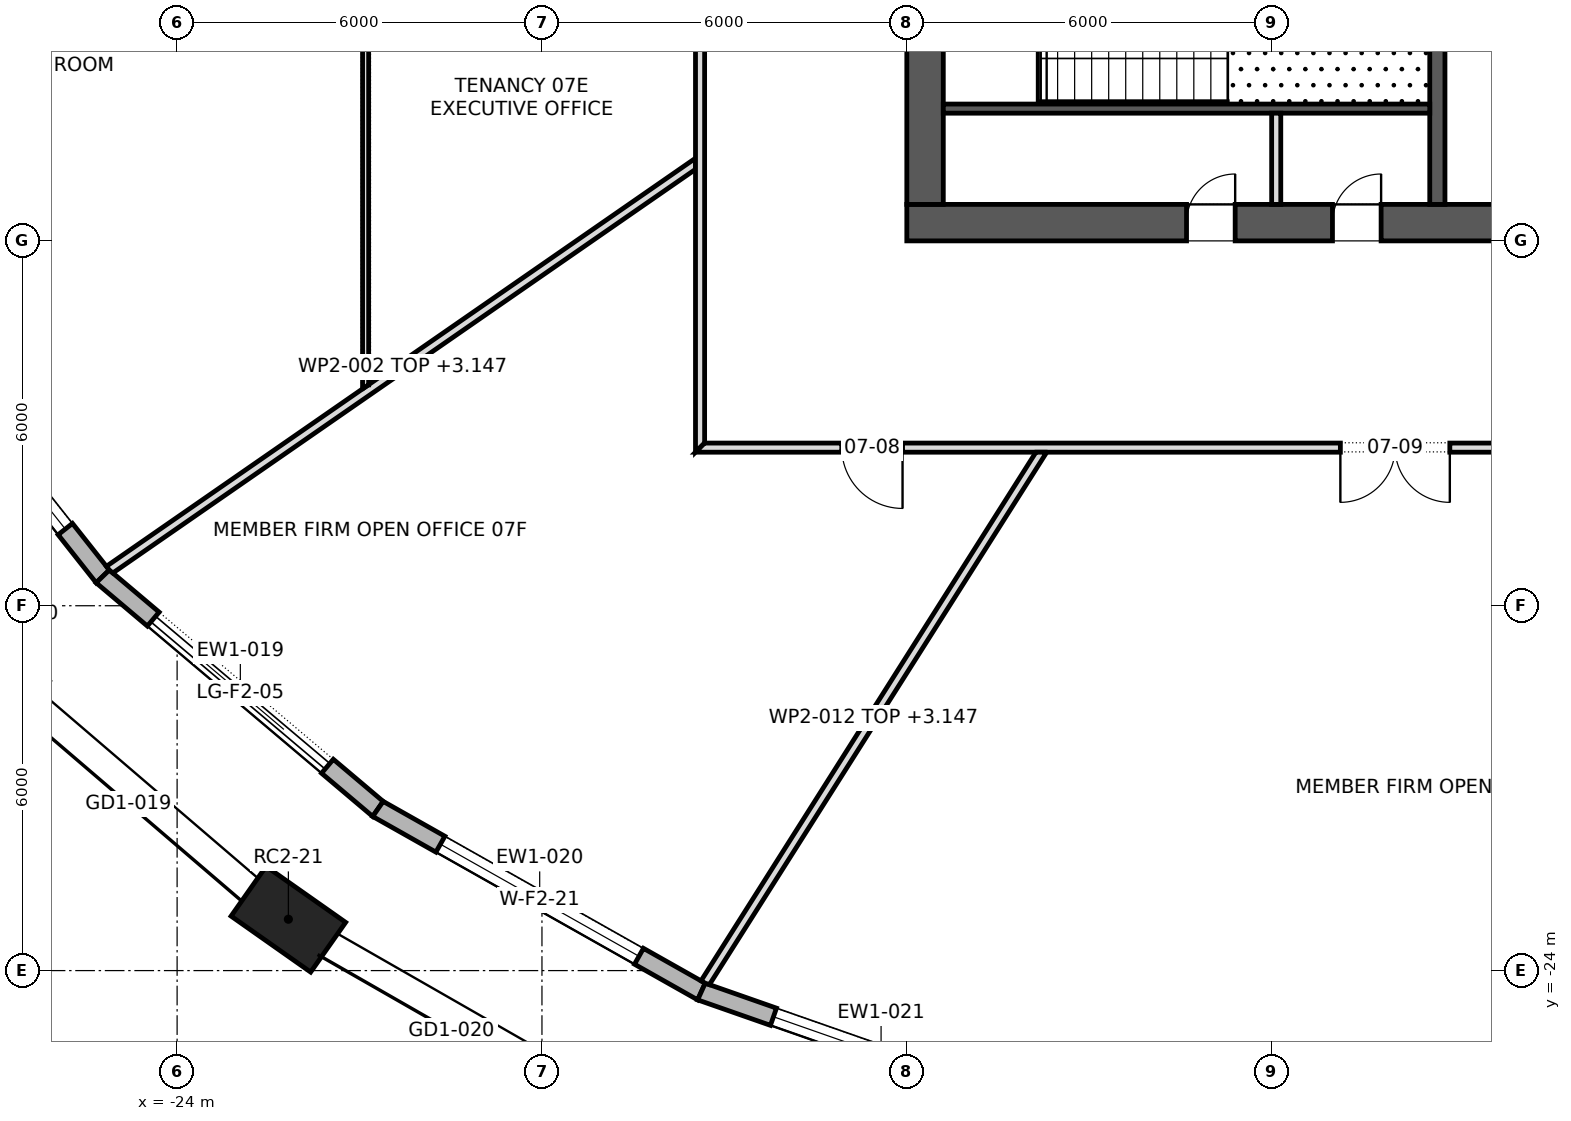
"""IFC4 building model, lengths in metres.
Left out: names, types, materials, properties, quantities, classifications, styles, units other than length and angle.
Written with IfcOpenShell. Run it as: python <this file> out.ifc"""

import sys

from ifc_helpers import new_model, si_unit, direction, frame, frame_2d, origin, origin_2d, place, context, subcontext, project, spatial, polyline, rectangle, outline, extrude, element, fill, save


model = new_model("IFC4")
c1 = context("Model", 3, precision=1e-05, world=origin(), true_north=direction((0.0, 1.0)))
c2 = subcontext(c1, "Body", "Model", "MODEL_VIEW")
j1 = project(units=[si_unit("LENGTHUNIT", "METRE"), si_unit("PLANEANGLEUNIT", "RADIAN")], contexts=[c1])
p1 = place(None, origin())
s1 = spatial("IfcSite", under=j1, at=p1, CompositionType="ELEMENT")
p2 = place(p1, origin())
s2 = spatial("IfcBuilding", under=s1, at=p2, CompositionType="ELEMENT")
p3 = place(p2, frame((0.0, 0.0, 112.9)))
s3 = spatial("IfcBuildingStorey", under=s2, at=p3, CompositionType="ELEMENT", Elevation=112.9)
p4 = place(p3, frame((-22.17, -23.156, 0.0), z_axis=(0.0, 0.0, 1.0), x_axis=(0.817906779671, -0.575350762377, 0.0)))
e1 = element("IfcColumn", 1, at=p4, inside=s3, PredefinedType="COLUMN", context=c2, shape_type="SweptSolid", body=[
    extrude(rectangle(XDim=1.6, YDim=1.0, at=origin_2d()), origin(), (0.0, 0.0, 1.0), 4.2),
])
p5 = place(p3, frame((-12.0, -11.7, 0.0), z_axis=(0.0, 0.0, 1.0), x_axis=(1.0, 0.0, 0.0)))
e2 = element("IfcWall", 2, at=p5, inside=s3, PredefinedType="SHEAR", context=c2, shape_type="SweptSolid", body=[
    extrude(rectangle(XDim=24.0, YDim=0.6, at=frame_2d((12.0, 0.0))), origin(), (0.0, 0.0, 1.0), 4.2),
])
p6 = place(p5, frame((9.975, 0.0, 0.0)))
e3 = element("IfcOpeningElement", 3, at=p6, cuts=e2, PredefinedType="OPENING", context=c2, shape_type="SweptSolid", body=[
    extrude(rectangle(XDim=0.9, YDim=2.1, at=frame_2d((0.45, 1.05))), frame((0.0, 0.312, 0.0), z_axis=(0.0, -1.0, 0.0), x_axis=(1.0, 0.0, 0.0)), (0.0, 0.0, 1.0), 0.624),
])
p7 = place(p5, frame((4.6, 0.0, 0.0)))
e4 = element("IfcOpeningElement", 4, at=p7, cuts=e2, PredefinedType="OPENING", context=c2, shape_type="SweptSolid", body=[
    extrude(rectangle(XDim=0.8, YDim=2.1, at=frame_2d((0.4, 1.05))), frame((0.0, 0.312, 0.0), z_axis=(0.0, -1.0, 0.0), x_axis=(1.0, 0.0, 0.0)), (0.0, 0.0, 1.0), 0.624),
])
p8 = place(p5, frame((7.0, 0.0, 0.0)))
e5 = element("IfcOpeningElement", 5, at=p8, cuts=e2, PredefinedType="OPENING", context=c2, shape_type="SweptSolid", body=[
    extrude(rectangle(XDim=0.8, YDim=2.1, at=frame_2d((0.4, 1.05))), frame((0.0, 0.312, 0.0), z_axis=(0.0, -1.0, 0.0), x_axis=(1.0, 0.0, 0.0)), (0.0, 0.0, 1.0), 0.624),
])
p9 = place(p5, frame((15.85, 0.0, 0.0)))
e6 = element("IfcOpeningElement", 6, at=p9, cuts=e2, PredefinedType="OPENING", context=c2, shape_type="SweptSolid", body=[
    extrude(rectangle(XDim=0.8, YDim=2.1, at=frame_2d((0.4, 1.05))), frame((0.0, 0.312, 0.0), z_axis=(0.0, -1.0, 0.0), x_axis=(1.0, 0.0, 0.0)), (0.0, 0.0, 1.0), 0.624),
])
p10 = place(p3, frame((-11.7, -11.4, 0.0), z_axis=(0.0, 0.0, 1.0), x_axis=(0.0, 1.0, 0.0)))
e7 = element("IfcWall", 7, at=p10, inside=s3, PredefinedType="SHEAR", context=c2, shape_type="SweptSolid", body=[
    extrude(rectangle(XDim=22.8, YDim=0.6, at=frame_2d((11.4, 0.0))), origin(), (0.0, 0.0, 1.0), 4.2),
])
p11 = place(p10, frame((10.2, 0.0, 0.0)))
e8 = element("IfcOpeningElement", 8, at=p11, cuts=e7, PredefinedType="OPENING", context=c2, shape_type="SweptSolid", body=[
    extrude(rectangle(XDim=2.4, YDim=2.1, at=frame_2d((1.2, 1.05))), frame((0.0, 0.312, 0.0), z_axis=(0.0, -1.0, 0.0), x_axis=(1.0, 0.0, 0.0)), (0.0, 0.0, 1.0), 0.624),
])
p12 = place(p10, frame((18.925, 0.0, 0.0)))
e9 = element("IfcOpeningElement", 9, at=p12, cuts=e7, PredefinedType="OPENING", context=c2, shape_type="SweptSolid", body=[
    extrude(rectangle(XDim=1.2, YDim=2.1, at=frame_2d((0.6, 1.05))), frame((0.0, 0.312, 0.0), z_axis=(0.0, -1.0, 0.0), x_axis=(1.0, 0.0, 0.0)), (0.0, 0.0, 1.0), 0.624),
])
p13 = place(p10, frame((2.675, 0.0, 0.0)))
e10 = element("IfcOpeningElement", 10, at=p13, cuts=e7, PredefinedType="OPENING", context=c2, shape_type="SweptSolid", body=[
    extrude(rectangle(XDim=1.2, YDim=2.1, at=frame_2d((0.6, 1.05))), frame((0.0, 0.312, 0.0), z_axis=(0.0, -1.0, 0.0), x_axis=(1.0, 0.0, 0.0)), (0.0, 0.0, 1.0), 0.624),
])
p14 = place(p3, frame((-28.781, -13.019, 0.0), z_axis=(0.0, 0.0, 1.0), x_axis=(0.620329992039, -0.784340934146, 0.0)))
e11 = element("IfcWall", 11, at=p14, inside=s3, PredefinedType="STANDARD", context=c2, shape_type="SweptSolid", body=[
    extrude(outline(polyline([(-0.016, -0.15), (5.75, -0.15), (5.72, 0.15), (0.016, 0.15), (-0.016, -0.15)])), origin(), (0.0, 0.0, 1.0), 3.9),
])
p15 = place(p14, frame((0.993, 0.0, 0.6)))
e12 = element("IfcOpeningElement", 12, at=p15, cuts=e11, PredefinedType="OPENING", context=c2, shape_type="SweptSolid", body=[
    extrude(rectangle(XDim=3.75, YDim=2.85, at=frame_2d((1.875, 1.425))), frame((0.0, 0.162, 0.0), z_axis=(0.0, -1.0, 0.0), x_axis=(1.0, 0.0, 0.0)), (0.0, 0.0, 1.0), 0.324),
])
p16 = place(p3, frame((-25.223, -17.518, 0.0), z_axis=(0.0, 0.0, 1.0), x_axis=(0.763894031266, -0.645341699409, 0.0)))
e13 = element("IfcWall", 13, at=p16, inside=s3, PredefinedType="STANDARD", context=c2, shape_type="SweptSolid", body=[
    extrude(outline(polyline([(-0.015, -0.15), (5.939, -0.15), (5.911, 0.15), (0.015, 0.15), (-0.015, -0.15)])), origin(), (0.0, 0.0, 1.0), 3.9),
])
p17 = place(p16, frame((1.087, 0.0, 0.0)))
e14 = element("IfcOpeningElement", 14, at=p17, cuts=e13, PredefinedType="OPENING", context=c2, shape_type="SweptSolid", body=[
    extrude(rectangle(XDim=3.75, YDim=3.45, at=frame_2d((1.875, 1.725))), frame((0.0, 0.162, 0.0), z_axis=(0.0, -1.0, 0.0), x_axis=(1.0, 0.0, 0.0)), (0.0, 0.0, 1.0), 0.324),
])
p18 = place(p3, frame((-20.697, -21.341, 0.0), z_axis=(0.0, 0.0, 1.0), x_axis=(0.870828448417, -0.491587035455, 0.0)))
e15 = element("IfcWall", 15, at=p18, inside=s3, PredefinedType="STANDARD", context=c2, shape_type="SweptSolid", body=[
    extrude(outline(polyline([(-0.014, -0.15), (6.122, -0.15), (6.095, 0.15), (0.014, 0.15), (-0.014, -0.15)])), origin(), (0.0, 0.0, 1.0), 3.9),
])
p19 = place(p18, frame((1.179, 0.0, 0.6)))
e16 = element("IfcOpeningElement", 16, at=p19, cuts=e15, PredefinedType="OPENING", context=c2, shape_type="SweptSolid", body=[
    extrude(rectangle(XDim=3.75, YDim=2.85, at=frame_2d((1.875, 1.425))), frame((0.0, 0.162, 0.0), z_axis=(0.0, -1.0, 0.0), x_axis=(1.0, 0.0, 0.0)), (0.0, 0.0, 1.0), 0.324),
])
p20 = place(p3, frame((-15.377, -24.344, 0.0), z_axis=(0.0, 0.0, 1.0), x_axis=(0.943866868202, -0.330326104193, 0.0)))
e17 = element("IfcWall", 17, at=p20, inside=s3, PredefinedType="STANDARD", context=c2, shape_type="SweptSolid", body=[
    extrude(outline(polyline([(-0.013, -0.15), (6.273, -0.15), (6.247, 0.15), (0.013, 0.15), (-0.013, -0.15)])), origin(), (0.0, 0.0, 1.0), 3.9),
])
p21 = place(p20, frame((1.255, 0.0, 0.6)))
e18 = element("IfcOpeningElement", 18, at=p21, cuts=e17, PredefinedType="OPENING", context=c2, shape_type="SweptSolid", body=[
    extrude(rectangle(XDim=3.75, YDim=2.85, at=frame_2d((1.875, 1.425))), frame((0.0, 0.162, 0.0), z_axis=(0.0, -1.0, 0.0), x_axis=(1.0, 0.0, 0.0)), (0.0, 0.0, 1.0), 0.324),
])
p22 = place(p3, frame((-3.275, -11.4, 0.0), z_axis=(0.0, 0.0, 1.0), x_axis=(0.0, 1.0, 0.0)))
e19 = element("IfcWall", 19, at=p22, inside=s3, PredefinedType="SHEAR", context=c2, shape_type="SweptSolid", body=[
    extrude(rectangle(XDim=4.9, YDim=0.25, at=frame_2d((2.45, 0.0))), origin(), (0.0, 0.0, 1.0), 3.9),
])
p23 = place(p3, frame((-11.4, -9.825, 0.0), z_axis=(0.0, 0.0, 1.0), x_axis=(1.0, 0.0, 0.0)))
e20 = element("IfcWall", 20, at=p23, inside=s3, PredefinedType="SHEAR", context=c2, shape_type="SweptSolid", body=[
    extrude(rectangle(XDim=8.0, YDim=0.15, at=frame_2d((4.0, 0.0))), origin(), (0.0, 0.0, 1.0), 3.9),
])
p24 = place(p3, frame((-5.925, -11.4, 0.0), z_axis=(0.0, 0.0, 1.0), x_axis=(0.0, 1.0, 0.0)))
e21 = element("IfcWall", 21, at=p24, inside=s3, PredefinedType="PARTITIONING", context=c2, shape_type="SweptSolid", body=[
    extrude(rectangle(XDim=1.5, YDim=0.15, at=frame_2d((0.75, 0.0))), origin(), (0.0, 0.0, 1.0), 3.9),
])
p25 = place(p3, frame((-25.12, -17.414, 0.0), z_axis=(0.0, 0.0, 1.0), x_axis=(0.822008683907, 0.569474954306, 0.0)))
e22 = element("IfcWall", 22, at=p25, inside=s3, PredefinedType="PARTITIONING", context=c2, shape_type="SweptSolid", body=[
    extrude(outline(polyline([(0.024, -0.075), (1.967, -0.075), (3.91, -0.075), (5.853, -0.075), (7.796, -0.075), (9.739, -0.075), (11.681, -0.075), (11.734, 0.002), (11.734, 0.002), (11.785, 0.074), (11.785, 0.075), (10.15, 0.075), (8.516, 0.075), (6.881, 0.075), (5.246, 0.075), (5.245, 0.072), (5.241, 0.075), (3.494, 0.075), (1.747, 0.075), (0.0, 0.075), (0.0, 0.07), (0.005, -0.002), (0.024, -0.075)])), origin(), (0.0, 0.0, 1.0), 3.147),
])
p26 = place(p3, frame((-20.9, -14.434, 0.0), z_axis=(0.0, 0.0, 1.0), x_axis=(0.0, 1.0, 0.0)))
e23 = element("IfcWall", 23, at=p26, inside=s3, PredefinedType="PARTITIONING", context=c2, shape_type="SweptSolid", body=[
    extrude(outline(polyline([(0.069, -0.05), (1.772, -0.05), (3.475, -0.05), (5.178, -0.05), (6.881, -0.05), (8.583, -0.05), (8.583, -0.05), (8.684, -0.05), (8.684, -0.05), (10.321, -0.05), (11.958, -0.05), (13.596, -0.05), (15.234, -0.05), (15.234, -0.05), (15.333, -0.05), (15.333, -0.05), (16.789, -0.05), (18.245, -0.05), (19.701, -0.05), (19.727, 0.05), (19.727, 0.05), (17.942, 0.05), (16.156, 0.05), (14.372, 0.05), (12.587, 0.05), (10.802, 0.05), (9.017, 0.05), (9.01, 0.048), (9.009, 0.05), (7.208, 0.05), (5.406, 0.05), (3.604, 0.05), (1.802, 0.05), (0.0, 0.05), (0.069, -0.05)])), origin(), (0.0, 0.0, 1.0), 3.9),
])
p27 = place(p26, frame((13.539, 0.0, 0.0)))
e24 = element("IfcOpeningElement", 24, at=p27, cuts=e23, PredefinedType="OPENING", context=c2, shape_type="SweptSolid", body=[
    extrude(rectangle(XDim=0.9, YDim=2.1, at=frame_2d((0.45, 1.05))), frame((0.0, 0.062, 0.0), z_axis=(0.0, -1.0, 0.0), x_axis=(1.0, 0.0, 0.0)), (0.0, 0.0, 1.0), 0.124),
])
p28 = place(p3, frame((-15.4, -15.475, 0.0), z_axis=(0.0, 0.0, 1.0), x_axis=(0.0, 1.0, 0.0)))
e25 = element("IfcWall", 25, at=p28, inside=s3, PredefinedType="PARTITIONING", context=c2, shape_type="SweptSolid", body=[
    extrude(outline(polyline([(0.15, -0.075), (2.066, -0.075), (3.981, -0.075), (5.897, -0.075), (7.812, -0.075), (9.728, -0.075), (11.644, -0.075), (13.56, -0.075), (15.475, -0.075), (17.391, -0.075), (19.306, -0.075), (21.222, -0.075), (23.138, -0.075), (25.053, -0.075), (26.969, -0.075), (28.885, -0.075), (30.8, -0.075), (30.95, 0.075), (29.016, 0.075), (27.081, 0.075), (25.147, 0.075), (23.212, 0.075), (21.278, 0.075), (19.344, 0.075), (17.409, 0.075), (15.475, 0.075), (13.541, 0.075), (11.606, 0.075), (9.672, 0.075), (7.738, 0.075), (5.803, 0.075), (3.869, 0.075), (1.935, 0.075), (0.0, 0.075), (0.15, -0.075)])), origin(), (0.0, 0.0, 1.0), 3.9),
])
p29 = place(p28, frame((24.25, 0.0, 0.0)))
e26 = element("IfcOpeningElement", 26, at=p29, cuts=e25, PredefinedType="OPENING", context=c2, shape_type="SweptSolid", body=[
    extrude(rectangle(XDim=1.8, YDim=2.1, at=frame_2d((0.9, 1.05))), frame((0.0, 0.087, 0.0), z_axis=(0.0, -1.0, 0.0), x_axis=(1.0, 0.0, 0.0)), (0.0, 0.0, 1.0), 0.174),
])
p30 = place(p28, frame((6.735, 0.0, 0.0)))
e27 = element("IfcOpeningElement", 27, at=p30, cuts=e25, PredefinedType="OPENING", context=c2, shape_type="SweptSolid", body=[
    extrude(rectangle(XDim=1.0, YDim=2.1, at=frame_2d((0.5, 1.05))), frame((0.0, 0.087, 0.0), z_axis=(0.0, -1.0, 0.0), x_axis=(1.0, 0.0, 0.0)), (0.0, 0.0, 1.0), 0.174),
])
p31 = place(p28, frame((12.5, 0.0, 0.0)))
e28 = element("IfcOpeningElement", 28, at=p31, cuts=e25, PredefinedType="OPENING", context=c2, shape_type="SweptSolid", body=[
    extrude(rectangle(XDim=1.0, YDim=2.1, at=frame_2d((0.5, 1.05))), frame((0.0, 0.087, 0.0), z_axis=(0.0, -1.0, 0.0), x_axis=(1.0, 0.0, 0.0)), (0.0, 0.0, 1.0), 0.174),
])
p32 = place(p28, frame((17.375, 0.0, 0.0)))
e29 = element("IfcOpeningElement", 29, at=p32, cuts=e25, PredefinedType="OPENING", context=c2, shape_type="SweptSolid", body=[
    extrude(rectangle(XDim=1.0, YDim=2.1, at=frame_2d((0.5, 1.05))), frame((0.0, 0.087, 0.0), z_axis=(0.0, -1.0, 0.0), x_axis=(1.0, 0.0, 0.0)), (0.0, 0.0, 1.0), 0.174),
])
p33 = place(p3, frame((-15.475, -15.4, 0.0), z_axis=(0.0, 0.0, 1.0), x_axis=(1.0, 0.0, 0.0)))
e30 = element("IfcWall", 30, at=p33, inside=s3, PredefinedType="PARTITIONING", context=c2, shape_type="SweptSolid", body=[
    extrude(outline(polyline([(0.0, -0.075), (1.935, -0.075), (3.869, -0.075), (5.803, -0.075), (7.738, -0.075), (9.672, -0.075), (11.606, -0.075), (13.541, -0.075), (15.475, -0.075), (17.409, -0.075), (19.344, -0.075), (21.278, -0.075), (23.212, -0.075), (25.147, -0.075), (27.081, -0.075), (29.016, -0.075), (30.95, -0.075), (30.8, 0.075), (28.885, 0.075), (26.969, 0.075), (25.053, 0.075), (23.138, 0.075), (21.222, 0.075), (19.306, 0.075), (17.391, 0.075), (15.475, 0.075), (13.56, 0.075), (11.644, 0.075), (9.728, 0.075), (7.812, 0.075), (5.897, 0.075), (3.981, 0.075), (2.066, 0.075), (0.15, 0.075), (0.0, -0.075)])), origin(), (0.0, 0.0, 1.0), 3.9),
])
p34 = place(p33, frame((2.405, 0.0, 0.0)))
e31 = element("IfcOpeningElement", 31, at=p34, cuts=e30, PredefinedType="OPENING", context=c2, shape_type="SweptSolid", body=[
    extrude(rectangle(XDim=1.0, YDim=2.1, at=frame_2d((0.5, 1.05))), frame((0.0, 0.087, 0.0), z_axis=(0.0, -1.0, 0.0), x_axis=(1.0, 0.0, 0.0)), (0.0, 0.0, 1.0), 0.174),
])
p35 = place(p33, frame((10.605, 0.0, 0.0)))
e32 = element("IfcOpeningElement", 32, at=p35, cuts=e30, PredefinedType="OPENING", context=c2, shape_type="SweptSolid", body=[
    extrude(rectangle(XDim=1.8, YDim=2.1, at=frame_2d((0.9, 1.05))), frame((0.0, 0.087, 0.0), z_axis=(0.0, -1.0, 0.0), x_axis=(1.0, 0.0, 0.0)), (0.0, 0.0, 1.0), 0.174),
])
p36 = place(p33, frame((22.955, 0.0, 0.0)))
e33 = element("IfcOpeningElement", 33, at=p36, cuts=e30, PredefinedType="OPENING", context=c2, shape_type="SweptSolid", body=[
    extrude(rectangle(XDim=1.8, YDim=2.1, at=frame_2d((0.9, 1.05))), frame((0.0, 0.087, 0.0), z_axis=(0.0, -1.0, 0.0), x_axis=(1.0, 0.0, 0.0)), (0.0, 0.0, 1.0), 0.174),
])
p37 = place(p3, frame((-9.762, -15.435, 0.0), z_axis=(0.0, 0.0, 1.0), x_axis=(-0.535189090909, -0.844732287161, 0.0)))
e34 = element("IfcWall", 34, at=p37, inside=s3, PredefinedType="PARTITIONING", context=c2, shape_type="SweptSolid", body=[
    extrude(outline(polyline([(10.386, -0.075), (10.386, -0.069), (10.382, 0.004), (10.365, 0.075), (8.638, 0.075), (6.91, 0.075), (5.183, 0.075), (3.455, 0.075), (1.728, 0.075), (0.0, 0.075), (0.0, 0.075), (0.095, -0.075), (1.81, -0.075), (3.525, -0.075), (5.24, -0.075), (6.955, -0.075), (8.671, -0.075), (10.386, -0.075)])), origin(), (0.0, 0.0, 1.0), 3.147),
])
p38 = place(p15, origin())
e35 = element("IfcWindow", 35, at=p38, inside=s3, PartitioningType="TRIPLE_PANEL_VERTICAL", PredefinedType="WINDOW", context=c2, shape_type="SweptSolid", body=[
    extrude(rectangle(XDim=3.75, YDim=2.85, at=frame_2d((1.875, 1.425))), frame((0.0, 0.03, 0.0), z_axis=(0.0, -1.0, 0.0), x_axis=(1.0, 0.0, 0.0)), (0.0, 0.0, 1.0), 0.06),
])
fill(e12, e35)
p39 = place(p17, origin())
e36 = element("IfcDoor", 36, at=p39, inside=s3, OperationType="DOUBLE_DOOR_SLIDING", PredefinedType="DOOR", context=c2, shape_type="SweptSolid", body=[
    extrude(rectangle(XDim=3.75, YDim=3.45, at=frame_2d((1.875, 1.725))), frame((0.0, 0.025, 0.0), z_axis=(0.0, -1.0, 0.0), x_axis=(1.0, 0.0, 0.0)), (0.0, 0.0, 1.0), 0.05),
])
fill(e14, e36)
p40 = place(p19, origin())
e37 = element("IfcWindow", 37, at=p40, inside=s3, PartitioningType="TRIPLE_PANEL_VERTICAL", PredefinedType="WINDOW", context=c2, shape_type="SweptSolid", body=[
    extrude(rectangle(XDim=3.75, YDim=2.85, at=frame_2d((1.875, 1.425))), frame((0.0, 0.03, 0.0), z_axis=(0.0, -1.0, 0.0), x_axis=(1.0, 0.0, 0.0)), (0.0, 0.0, 1.0), 0.06),
])
fill(e16, e37)
p41 = place(p21, origin())
e38 = element("IfcWindow", 38, at=p41, inside=s3, PartitioningType="TRIPLE_PANEL_VERTICAL", PredefinedType="WINDOW", context=c2, shape_type="SweptSolid", body=[
    extrude(rectangle(XDim=3.75, YDim=2.85, at=frame_2d((1.875, 1.425))), frame((0.0, 0.03, 0.0), z_axis=(0.0, -1.0, 0.0), x_axis=(1.0, 0.0, 0.0)), (0.0, 0.0, 1.0), 0.06),
])
fill(e18, e38)
p42 = place(p7, origin())
e39 = element("IfcDoor", 39, at=p42, inside=s3, OperationType="SINGLE_SWING_LEFT", PredefinedType="DOOR", context=c2, shape_type="SweptSolid", body=[
    extrude(rectangle(XDim=0.8, YDim=2.1, at=frame_2d((0.4, 1.05))), frame((0.0, 0.025, 0.0), z_axis=(0.0, -1.0, 0.0), x_axis=(1.0, 0.0, 0.0)), (0.0, 0.0, 1.0), 0.05),
])
fill(e4, e39)
p43 = place(p8, origin())
e40 = element("IfcDoor", 40, at=p43, inside=s3, OperationType="SINGLE_SWING_LEFT", PredefinedType="DOOR", context=c2, shape_type="SweptSolid", body=[
    extrude(rectangle(XDim=0.8, YDim=2.1, at=frame_2d((0.4, 1.05))), frame((0.0, 0.025, 0.0), z_axis=(0.0, -1.0, 0.0), x_axis=(1.0, 0.0, 0.0)), (0.0, 0.0, 1.0), 0.05),
])
fill(e5, e40)
p44 = place(p34, frame((1.0, 0.0, 0.0), z_axis=(0.0, 0.0, 1.0), x_axis=(-1.0, 0.0, 0.0)))
e41 = element("IfcDoor", 41, at=p44, inside=s3, OperationType="SINGLE_SWING_RIGHT", PredefinedType="DOOR", context=c2, shape_type="SweptSolid", body=[
    extrude(rectangle(XDim=1.0, YDim=2.1, at=frame_2d((0.5, 1.05))), frame((0.0, 0.025, 0.0), z_axis=(0.0, -1.0, 0.0), x_axis=(1.0, 0.0, 0.0)), (0.0, 0.0, 1.0), 0.05),
])
fill(e31, e41)
p45 = place(p35, frame((1.8, 0.0, 0.0), z_axis=(0.0, 0.0, 1.0), x_axis=(-1.0, 0.0, 0.0)))
e42 = element("IfcDoor", 42, at=p45, inside=s3, OperationType="DOUBLE_DOOR_SINGLE_SWING", PredefinedType="DOOR", context=c2, shape_type="SweptSolid", body=[
    extrude(rectangle(XDim=1.8, YDim=2.1, at=frame_2d((0.9, 1.05))), frame((0.0, 0.025, 0.0), z_axis=(0.0, -1.0, 0.0), x_axis=(1.0, 0.0, 0.0)), (0.0, 0.0, 1.0), 0.05),
])
fill(e32, e42)
save(model, sys.argv[1])
